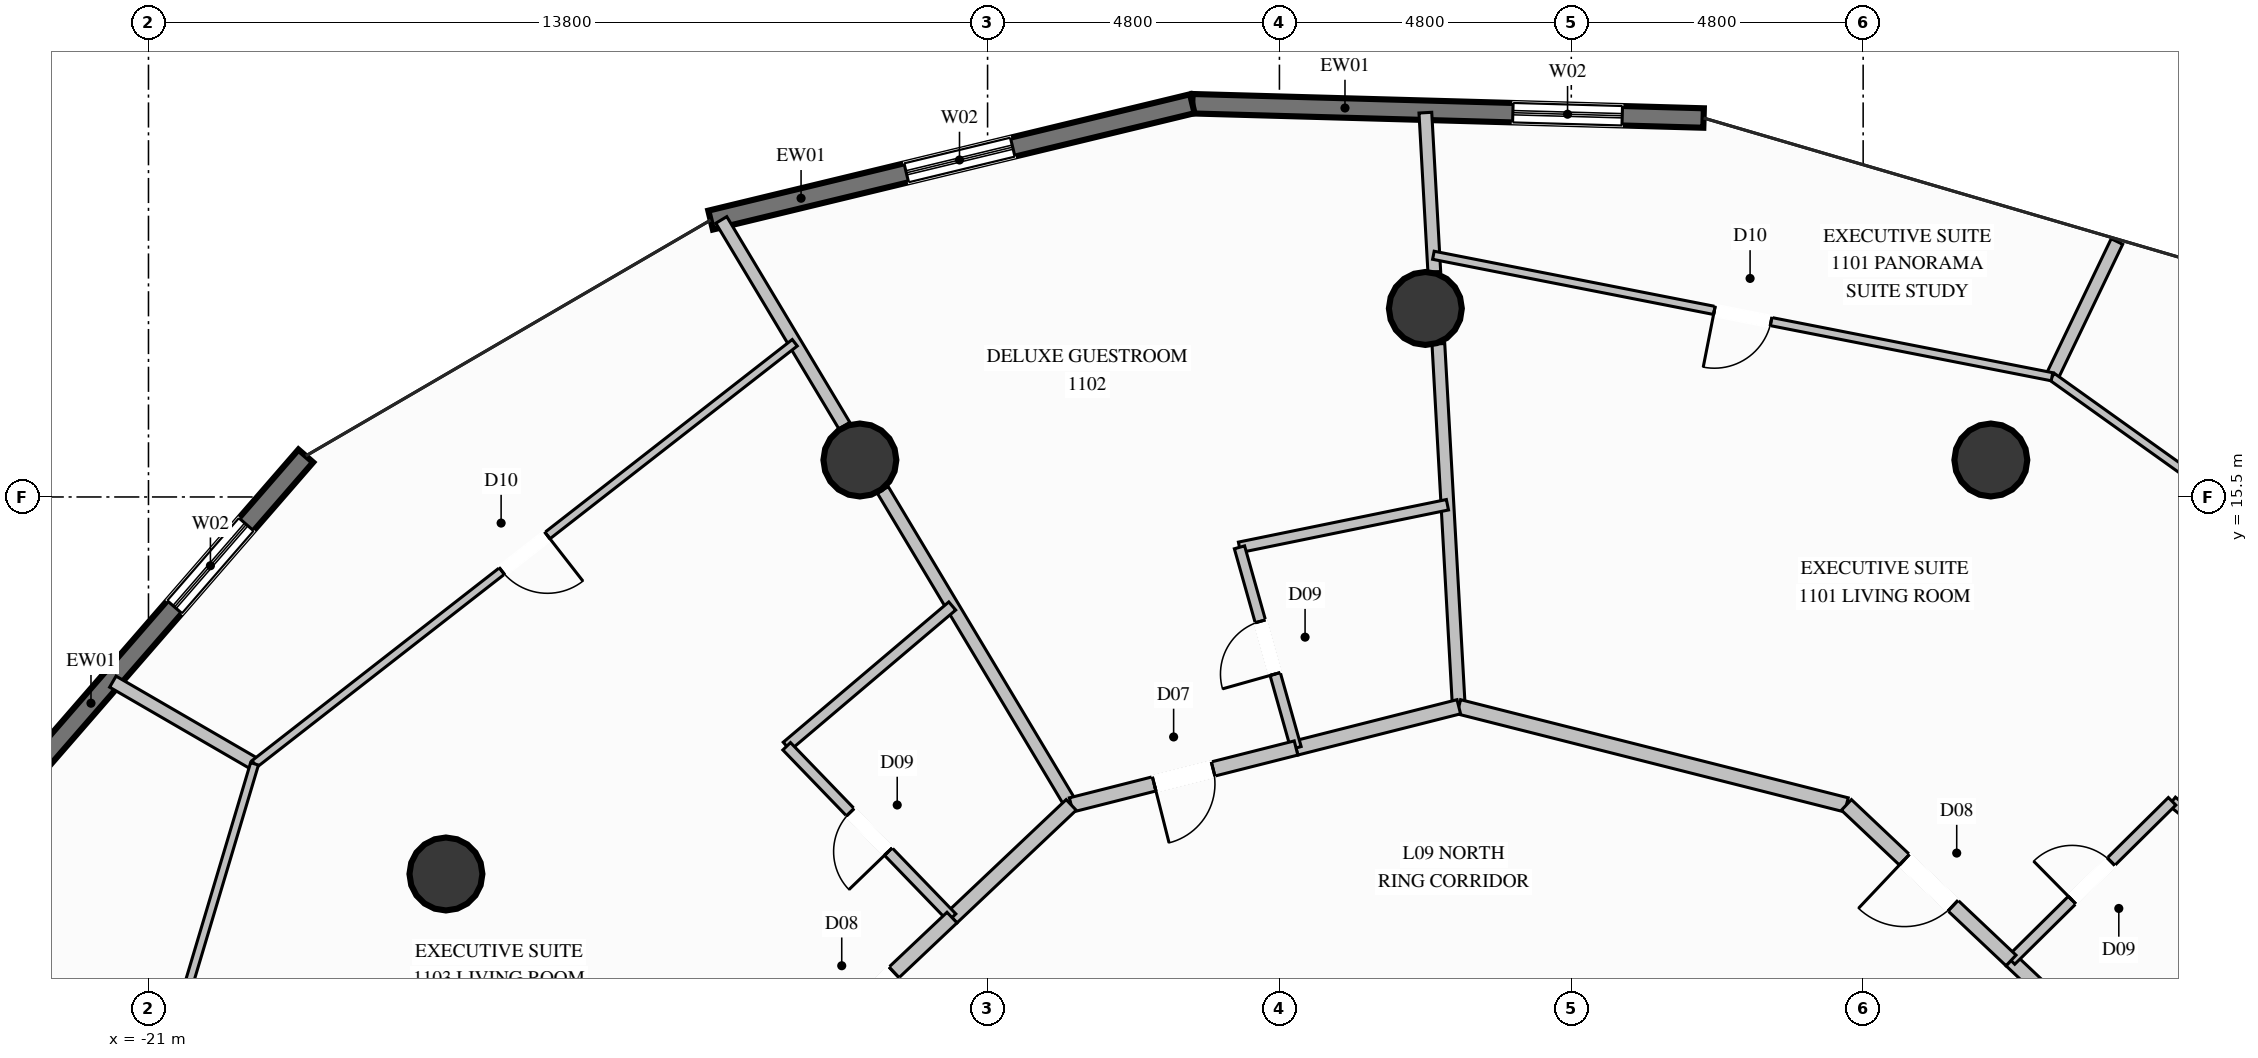
"""IFC4 building model, lengths in metres.
Left out: names, types, materials, properties, quantities, classifications, styles, units other than length and angle.
Written with IfcOpenShell. Run it as: python <this file> out.ifc"""

import sys

from ifc_helpers import new_model, si_unit, direction, frame, frame_2d, origin, origin_2d, place, context, subcontext, project, spatial, rectangle, circle, extrude, element, fill, save


model = new_model("IFC4")
c1 = context("Model", 3, precision=1e-05, world=origin(), true_north=direction((0.0, 1.0)))
c2 = subcontext(c1, "Body", "Model", "MODEL_VIEW")
j1 = project(units=[si_unit("LENGTHUNIT", "METRE"), si_unit("PLANEANGLEUNIT", "RADIAN")], contexts=[c1])
p1 = place(None, origin())
s1 = spatial("IfcSite", under=j1, at=p1, CompositionType="ELEMENT")
p2 = place(p1, origin())
s2 = spatial("IfcBuilding", under=s1, at=p2, CompositionType="ELEMENT")
p3 = place(p2, frame((0.0, 0.0, 42.8)))
s3 = spatial("IfcBuildingStorey", under=s2, at=p3, CompositionType="ELEMENT", Elevation=42.8)
for number, where, z_axis, x_axis in (
    (1, (9.3, 16.108, 0.0), (0.0, 0.0, 1.0), (1.0, 0.0, 0.0)),
    (2, (0.0, 18.6, 0.0), (0.0, 0.0, 1.0), (1.0, 0.0, 0.0)),
    (3, (-9.3, 16.108, 0.0), (0.0, 0.0, 1.0), (1.0, 0.0, 0.0)),
    (4, (-16.108, 9.3, 0.0), (0.0, 0.0, 1.0), (1.0, 0.0, 0.0)),
):
    element("IfcColumn", number, at=place(p3, frame(where, z_axis=z_axis, x_axis=x_axis)), inside=s3, PredefinedType="COLUMN", context=c2, shape_type="SweptSolid", body=[
        extrude(circle(Radius=0.6, at=origin_2d()), origin(), (0.0, 0.0, 1.0), 3.6),
    ])
p4 = place(p3, frame((-3.833, 21.967, 0.0), z_axis=(0.0, 0.0, 1.0), x_axis=(0.999609369541, -0.027948315271, 0.0)))
e5 = element("IfcWall", 5, at=p4, inside=s3, PredefinedType="SOLIDWALL", context=c2, shape_type="SweptSolid", body=[
    extrude(rectangle(XDim=8.412, YDim=0.32, at=frame_2d((4.206, 0.0))), origin(), (0.0, 0.0, 1.0), 3.34),
])
p5 = place(p4, frame((5.274, 0.0, 0.35)))
e6 = element("IfcOpeningElement", 6, at=p5, cuts=e5, PredefinedType="OPENING", context=c2, shape_type="SweptSolid", body=[
    extrude(rectangle(XDim=1.8, YDim=2.6, at=frame_2d((0.9, 1.3))), frame((0.0, 0.17, 0.0), z_axis=(0.0, -1.0, 0.0), x_axis=(1.0, 0.0, 0.0)), (0.0, 0.0, 1.0), 0.34),
])
p6 = place(p3, frame((-11.755, 20.053, 0.0), z_axis=(0.0, 0.0, 1.0), x_axis=(0.97202940664, 0.234859176161, 0.0)))
e7 = element("IfcWall", 7, at=p6, inside=s3, PredefinedType="SOLIDWALL", context=c2, shape_type="SweptSolid", body=[
    extrude(rectangle(XDim=8.15, YDim=0.32, at=frame_2d((4.075, 0.0))), origin(), (0.0, 0.0, 1.0), 3.34),
])
p7 = place(p6, frame((3.311, 0.0, 0.35)))
e8 = element("IfcOpeningElement", 8, at=p7, cuts=e7, PredefinedType="OPENING", context=c2, shape_type="SweptSolid", body=[
    extrude(rectangle(XDim=1.8, YDim=2.6, at=frame_2d((0.9, 1.3))), frame((0.0, 0.17, 0.0), z_axis=(0.0, -1.0, 0.0), x_axis=(1.0, 0.0, 0.0)), (0.0, 0.0, 1.0), 0.34),
])
p8 = place(p3, frame((-23.156, 10.715, 0.0), z_axis=(0.0, 0.0, 1.0), x_axis=(0.655795022555, 0.75493899647, 0.0)))
e9 = element("IfcWall", 9, at=p8, inside=s3, PredefinedType="SOLIDWALL", context=c2, shape_type="SweptSolid", body=[
    extrude(rectangle(XDim=7.232, YDim=0.32, at=frame_2d((3.616, 0.0))), origin(), (0.0, 0.0, 1.0), 3.34),
])
p9 = place(p8, frame((3.941, 0.0, 0.35)))
e10 = element("IfcOpeningElement", 10, at=p9, cuts=e9, PredefinedType="OPENING", context=c2, shape_type="SweptSolid", body=[
    extrude(rectangle(XDim=1.8, YDim=2.6, at=frame_2d((0.9, 1.3))), frame((0.0, 0.17, 0.0), z_axis=(0.0, -1.0, 0.0), x_axis=(1.0, 0.0, 0.0)), (0.0, 0.0, 1.0), 0.34),
])
p10 = place(p3, frame((11.592, 6.025, 0.0), z_axis=(0.0, 0.0, 1.0), x_axis=(0.841200533938, 0.540723276456, 0.0)))
e11 = element("IfcWall", 11, at=p10, inside=s3, PredefinedType="PARTITIONING", context=c2, shape_type="SweptSolid", body=[
    extrude(rectangle(XDim=5.034, YDim=0.21, at=frame_2d((2.517, 0.0))), origin(), (0.0, 0.0, 1.0), 2.708),
])
p11 = place(p3, frame((0.55, 12.05, 0.0), z_axis=(0.0, 0.0, 1.0), x_axis=(-0.056200663667, 0.998419493702, 0.0)))
e12 = element("IfcWall", 12, at=p11, inside=s3, PredefinedType="PARTITIONING", context=c2, shape_type="SweptSolid", body=[
    extrude(rectangle(XDim=5.978, YDim=0.21, at=frame_2d((2.989, 0.0))), origin(), (0.0, 0.0, 1.0), 2.708),
])
p12 = place(p3, frame((0.147, 19.202, 0.0), z_axis=(0.0, 0.0, 1.0), x_axis=(-0.056047530515, 0.99842810173, 0.0)))
e13 = element("IfcWall", 13, at=p12, inside=s3, PredefinedType="PARTITIONING", context=c2, shape_type="SweptSolid", body=[
    extrude(rectangle(XDim=2.622, YDim=0.21, at=frame_2d((1.311, 0.0))), origin(), (0.0, 0.0, 1.0), 3.34),
])
p13 = place(p3, frame((-5.825, 10.436, 0.0), z_axis=(0.0, 0.0, 1.0), x_axis=(-0.513299626213, 0.858209469611, 0.0)))
e14 = element("IfcWall", 14, at=p13, inside=s3, PredefinedType="PARTITIONING", context=c2, shape_type="SweptSolid", body=[
    extrude(rectangle(XDim=6.036, YDim=0.21, at=frame_2d((3.018, 0.0))), origin(), (0.0, 0.0, 1.0), 2.708),
])
p14 = place(p3, frame((-9.555, 16.673, 0.0), z_axis=(0.0, 0.0, 1.0), x_axis=(-0.513466244752, 0.858109792218, 0.0)))
e15 = element("IfcWall", 15, at=p14, inside=s3, PredefinedType="PARTITIONING", context=c2, shape_type="SweptSolid", body=[
    extrude(rectangle(XDim=3.942, YDim=0.21, at=frame_2d((1.971, 0.0))), origin(), (0.0, 0.0, 1.0), 3.34),
])
p15 = place(p3, frame((11.592, 6.025, 0.0), z_axis=(0.0, 0.0, 1.0), x_axis=(-0.726651583854, 0.687006168591, 0.0)))
e16 = element("IfcWall", 16, at=p15, inside=s3, PredefinedType="PARTITIONING", context=c2, shape_type="SweptSolid", body=[
    extrude(rectangle(XDim=2.697, YDim=0.24, at=frame_2d((1.349, 0.0))), origin(), (0.0, 0.0, 1.0), 3.34),
])
p16 = place(p3, frame((15.064, 8.257, 0.0), z_axis=(0.0, 0.0, 1.0), x_axis=(-0.779272237284, 0.626685551292, 0.0)))
e17 = element("IfcWall", 17, at=p16, inside=s3, PredefinedType="PLUMBINGWALL", context=c2, shape_type="SweptSolid", body=[
    extrude(rectangle(XDim=3.571, YDim=0.175, at=frame_2d((1.786, 0.0))), origin(), (0.0, 0.0, 1.0), 3.34),
])
p17 = place(p3, frame((9.632, 7.878, 0.0), z_axis=(0.0, 0.0, 1.0), x_axis=(0.711355516102, 0.702832362453, 0.0)))
e18 = element("IfcWall", 18, at=p17, inside=s3, PredefinedType="PLUMBINGWALL", context=c2, shape_type="SweptSolid", body=[
    extrude(rectangle(XDim=3.724, YDim=0.175, at=frame_2d((1.862, 0.0))), origin(), (0.0, 0.0, 1.0), 3.34),
])
p18 = place(p17, frame((1.412, 0.0, 0.0)))
e19 = element("IfcOpeningElement", 19, at=p18, cuts=e18, PredefinedType="OPENING", context=c2, shape_type="SweptSolid", body=[
    extrude(rectangle(XDim=0.9, YDim=2.1, at=frame_2d((0.45, 1.05))), frame((0.0, 0.098, 0.0), z_axis=(0.0, -1.0, 0.0), x_axis=(1.0, 0.0, 0.0)), (0.0, 0.0, 1.0), 0.195),
])
p19 = place(p3, frame((10.306, 17.477, 0.0), z_axis=(0.0, 0.0, 1.0), x_axis=(0.43294660359, 0.901419568481, 0.0)))
e20 = element("IfcWall", 20, at=p19, inside=s3, PredefinedType="PARTITIONING", context=c2, shape_type="SweptSolid", body=[
    extrude(rectangle(XDim=2.467, YDim=0.21, at=frame_2d((1.233, 0.0))), origin(), (0.0, 0.0, 1.0), 3.34),
])
p20 = place(p3, frame((6.925, 10.436, 0.0), z_axis=(0.0, 0.0, 1.0), x_axis=(-0.969413132073, 0.245434674331, 0.0)))
e21 = element("IfcWall", 21, at=p20, inside=s3, PredefinedType="PARTITIONING", context=c2, shape_type="SweptSolid", body=[
    extrude(rectangle(XDim=6.576, YDim=0.24, at=frame_2d((3.288, 0.0))), origin(), (0.0, 0.0, 1.0), 2.918),
])
p21 = place(p3, frame((9.632, 7.878, 0.0), z_axis=(0.0, 0.0, 1.0), x_axis=(-0.726816794063, 0.686831382413, 0.0)))
e22 = element("IfcWall", 22, at=p21, inside=s3, PredefinedType="PARTITIONING", context=c2, shape_type="SweptSolid", body=[
    extrude(rectangle(XDim=3.725, YDim=0.24, at=frame_2d((1.862, 0.0))), origin(), (0.0, 0.0, 1.0), 3.34),
])
p22 = place(p21, frame((1.312, 0.0, 0.0)))
e23 = element("IfcOpeningElement", 23, at=p22, cuts=e22, PredefinedType="OPENING", context=c2, shape_type="SweptSolid", body=[
    extrude(rectangle(XDim=1.1, YDim=2.3, at=frame_2d((0.55, 1.15))), frame((0.0, 0.13, 0.0), z_axis=(0.0, -1.0, 0.0), x_axis=(1.0, 0.0, 0.0)), (0.0, 0.0, 1.0), 0.26),
])
p23 = place(p3, frame((19.354, 11.014, 0.0), z_axis=(0.0, 0.0, 1.0), x_axis=(-0.813724569885, 0.581250655367, 0.0)))
e24 = element("IfcWall", 24, at=p23, inside=s3, PredefinedType="PARTITIONING", context=c2, shape_type="SweptSolid", body=[
    extrude(rectangle(XDim=11.119, YDim=0.135, at=frame_2d((5.56, 0.0))), origin(), (0.0, 0.0, 1.0), 3.34),
])
p24 = place(p23, frame((5.085, 0.0, 0.0)))
e25 = element("IfcOpeningElement", 25, at=p24, cuts=e24, PredefinedType="OPENING", context=c2, shape_type="SweptSolid", body=[
    extrude(rectangle(XDim=0.95, YDim=2.1, at=frame_2d((0.475, 1.05))), frame((0.0, 0.078, 0.0), z_axis=(0.0, -1.0, 0.0), x_axis=(1.0, 0.0, 0.0)), (0.0, 0.0, 1.0), 0.155),
])
p25 = place(p3, frame((10.306, 17.477, 0.0), z_axis=(0.0, 0.0, 1.0), x_axis=(-0.981255818222, 0.192709675953, 0.0)))
e26 = element("IfcWall", 26, at=p25, inside=s3, PredefinedType="PARTITIONING", context=c2, shape_type="SweptSolid", body=[
    extrude(rectangle(XDim=10.368, YDim=0.135, at=frame_2d((5.184, 0.0))), origin(), (0.0, 0.0, 1.0), 3.34),
])
p26 = place(p25, frame((4.709, 0.0, 0.0)))
e27 = element("IfcOpeningElement", 27, at=p26, cuts=e26, PredefinedType="OPENING", context=c2, shape_type="SweptSolid", body=[
    extrude(rectangle(XDim=0.95, YDim=2.1, at=frame_2d((0.475, 1.05))), frame((0.0, 0.078, 0.0), z_axis=(0.0, -1.0, 0.0), x_axis=(1.0, 0.0, 0.0)), (0.0, 0.0, 1.0), 0.155),
])
p27 = place(p3, frame((0.55, 12.05, 0.0), z_axis=(0.0, 0.0, 1.0), x_axis=(-0.969394271919, -0.245509155779, 0.0)))
e28 = element("IfcWall", 28, at=p27, inside=s3, PredefinedType="PARTITIONING", context=c2, shape_type="SweptSolid", body=[
    extrude(rectangle(XDim=2.761, YDim=0.24, at=frame_2d((1.381, 0.0))), origin(), (0.0, 0.0, 1.0), 2.918),
])
p28 = place(p3, frame((0.363, 15.372, 0.0), z_axis=(0.0, 0.0, 1.0), x_axis=(-0.979691208228, -0.200512185465, 0.0)))
e29 = element("IfcWall", 29, at=p28, inside=s3, PredefinedType="PLUMBINGWALL", context=c2, shape_type="SweptSolid", body=[
    extrude(rectangle(XDim=3.491, YDim=0.175, at=frame_2d((1.745, 0.0))), origin(), (0.0, 0.0, 1.0), 3.34),
])
p29 = place(p3, frame((-2.127, 11.372, 0.0), z_axis=(0.0, 0.0, 1.0), x_axis=(-0.271230141643, 0.962514524703, 0.0)))
e30 = element("IfcWall", 30, at=p29, inside=s3, PredefinedType="PLUMBINGWALL", context=c2, shape_type="SweptSolid", body=[
    extrude(rectangle(XDim=3.428, YDim=0.175, at=frame_2d((1.714, 0.0))), origin(), (0.0, 0.0, 1.0), 3.34),
])
p30 = place(p29, frame((1.264, 0.0, 0.0)))
e31 = element("IfcOpeningElement", 31, at=p30, cuts=e30, PredefinedType="OPENING", context=c2, shape_type="SweptSolid", body=[
    extrude(rectangle(XDim=0.9, YDim=2.1, at=frame_2d((0.45, 1.05))), frame((0.0, 0.098, 0.0), z_axis=(0.0, -1.0, 0.0), x_axis=(1.0, 0.0, 0.0)), (0.0, 0.0, 1.0), 0.195),
])
p31 = place(p3, frame((-2.127, 11.372, 0.0), z_axis=(0.0, 0.0, 1.0), x_axis=(-0.969426781934, -0.245380754072, 0.0)))
e32 = element("IfcWall", 32, at=p31, inside=s3, PredefinedType="PARTITIONING", context=c2, shape_type="SweptSolid", body=[
    extrude(rectangle(XDim=3.815, YDim=0.24, at=frame_2d((1.907, 0.0))), origin(), (0.0, 0.0, 1.0), 2.918),
])
p32 = place(p31, frame((1.407, 0.0, 0.0)))
e33 = element("IfcOpeningElement", 33, at=p32, cuts=e32, PredefinedType="OPENING", context=c2, shape_type="SweptSolid", body=[
    extrude(rectangle(XDim=1.0, YDim=2.2, at=frame_2d((0.5, 1.1))), frame((0.0, 0.13, 0.0), z_axis=(0.0, -1.0, 0.0), x_axis=(1.0, 0.0, 0.0)), (0.0, 0.0, 1.0), 0.26),
])
p33 = place(p3, frame((-5.825, 10.436, 0.0), z_axis=(0.0, 0.0, 1.0), x_axis=(-0.726651583854, -0.687006168591, 0.0)))
e34 = element("IfcWall", 34, at=p33, inside=s3, PredefinedType="PARTITIONING", context=c2, shape_type="SweptSolid", body=[
    extrude(rectangle(XDim=2.697, YDim=0.24, at=frame_2d((1.349, 0.0))), origin(), (0.0, 0.0, 1.0), 3.34),
])
p34 = place(p3, frame((-7.781, 13.707, 0.0), z_axis=(0.0, 0.0, 1.0), x_axis=(-0.762952785228, -0.646454211459, 0.0)))
e35 = element("IfcWall", 35, at=p34, inside=s3, PredefinedType="PLUMBINGWALL", context=c2, shape_type="SweptSolid", body=[
    extrude(rectangle(XDim=3.569, YDim=0.175, at=frame_2d((1.784, 0.0))), origin(), (0.0, 0.0, 1.0), 3.34),
])
p35 = place(p3, frame((-7.785, 8.583, 0.0), z_axis=(0.0, 0.0, 1.0), x_axis=(-0.694493235648, 0.71949923255, 0.0)))
e36 = element("IfcWall", 36, at=p35, inside=s3, PredefinedType="PLUMBINGWALL", context=c2, shape_type="SweptSolid", body=[
    extrude(rectangle(XDim=3.915, YDim=0.175, at=frame_2d((1.958, 0.0))), origin(), (0.0, 0.0, 1.0), 2.708),
])
p36 = place(p35, frame((1.508, 0.0, 0.0)))
e37 = element("IfcOpeningElement", 37, at=p36, cuts=e36, PredefinedType="OPENING", context=c2, shape_type="SweptSolid", body=[
    extrude(rectangle(XDim=0.9, YDim=2.1, at=frame_2d((0.45, 1.05))), frame((0.0, 0.098, 0.0), z_axis=(0.0, -1.0, 0.0), x_axis=(1.0, 0.0, 0.0)), (0.0, 0.0, 1.0), 0.195),
])
p37 = place(p3, frame((-19.256, 11.111, 0.0), z_axis=(0.0, 0.0, 1.0), x_axis=(-0.864950144423, 0.501857796256, 0.0)))
e38 = element("IfcWall", 38, at=p37, inside=s3, PredefinedType="PARTITIONING", context=c2, shape_type="SweptSolid", body=[
    extrude(rectangle(XDim=2.694, YDim=0.21, at=frame_2d((1.347, 0.0))), origin(), (0.0, 0.0, 1.0), 3.34),
])
p38 = place(p3, frame((-7.785, 8.583, 0.0), z_axis=(0.0, 0.0, 1.0), x_axis=(-0.726816794063, -0.686831382413, 0.0)))
e39 = element("IfcWall", 39, at=p38, inside=s3, PredefinedType="PARTITIONING", context=c2, shape_type="SweptSolid", body=[
    extrude(rectangle(XDim=3.725, YDim=0.24, at=frame_2d((1.862, 0.0))), origin(), (0.0, 0.0, 1.0), 3.34),
])
p39 = place(p38, frame((1.312, 0.0, 0.0)))
e40 = element("IfcOpeningElement", 40, at=p39, cuts=e39, PredefinedType="OPENING", context=c2, shape_type="SweptSolid", body=[
    extrude(rectangle(XDim=1.1, YDim=2.3, at=frame_2d((0.55, 1.15))), frame((0.0, 0.13, 0.0), z_axis=(0.0, -1.0, 0.0), x_axis=(1.0, 0.0, 0.0)), (0.0, 0.0, 1.0), 0.26),
])
p40 = place(p3, frame((-10.371, 18.036, 0.0), z_axis=(0.0, 0.0, 1.0), x_axis=(-0.788739150212, -0.614728031671, 0.0)))
e41 = element("IfcWall", 41, at=p40, inside=s3, PredefinedType="PARTITIONING", context=c2, shape_type="SweptSolid", body=[
    extrude(rectangle(XDim=11.265, YDim=0.135, at=frame_2d((5.632, 0.0))), origin(), (0.0, 0.0, 1.0), 3.34),
])
p41 = place(p40, frame((5.157, 0.0, 0.0)))
e42 = element("IfcOpeningElement", 42, at=p41, cuts=e41, PredefinedType="OPENING", context=c2, shape_type="SweptSolid", body=[
    extrude(rectangle(XDim=0.95, YDim=2.1, at=frame_2d((0.475, 1.05))), frame((0.0, 0.078, 0.0), z_axis=(0.0, -1.0, 0.0), x_axis=(1.0, 0.0, 0.0)), (0.0, 0.0, 1.0), 0.155),
])
p42 = place(p3, frame((-19.256, 11.111, 0.0), z_axis=(0.0, 0.0, 1.0), x_axis=(-0.28604764492, -0.958215395846, 0.0)))
e43 = element("IfcWall", 43, at=p42, inside=s3, PredefinedType="PARTITIONING", context=c2, shape_type="SweptSolid", body=[
    extrude(rectangle(XDim=11.596, YDim=0.135, at=frame_2d((5.798, 0.0))), origin(), (0.0, 0.0, 1.0), 3.34),
])
p43 = place(p42, frame((5.323, 0.0, 0.0)))
e44 = element("IfcOpeningElement", 44, at=p43, cuts=e43, PredefinedType="OPENING", context=c2, shape_type="SweptSolid", body=[
    extrude(rectangle(XDim=0.95, YDim=2.1, at=frame_2d((0.475, 1.05))), frame((0.0, 0.078, 0.0), z_axis=(0.0, -1.0, 0.0), x_axis=(1.0, 0.0, 0.0)), (0.0, 0.0, 1.0), 0.155),
])
p44 = place(p5, origin())
e45 = element("IfcWindow", 45, at=p44, inside=s3, PartitioningType="SINGLE_PANEL", PredefinedType="WINDOW", context=c2, shape_type="SweptSolid", body=[
    extrude(rectangle(XDim=1.8, YDim=2.6, at=frame_2d((0.9, 1.3))), frame((0.0, 0.03, 0.0), z_axis=(0.0, -1.0, 0.0), x_axis=(1.0, 0.0, 0.0)), (0.0, 0.0, 1.0), 0.06),
])
fill(e6, e45)
p45 = place(p7, origin())
e46 = element("IfcWindow", 46, at=p45, inside=s3, PartitioningType="SINGLE_PANEL", PredefinedType="WINDOW", context=c2, shape_type="SweptSolid", body=[
    extrude(rectangle(XDim=1.8, YDim=2.6, at=frame_2d((0.9, 1.3))), frame((0.0, 0.03, 0.0), z_axis=(0.0, -1.0, 0.0), x_axis=(1.0, 0.0, 0.0)), (0.0, 0.0, 1.0), 0.06),
])
fill(e8, e46)
p46 = place(p9, origin())
e47 = element("IfcWindow", 47, at=p46, inside=s3, PartitioningType="SINGLE_PANEL", PredefinedType="WINDOW", context=c2, shape_type="SweptSolid", body=[
    extrude(rectangle(XDim=1.8, YDim=2.6, at=frame_2d((0.9, 1.3))), frame((0.0, 0.03, 0.0), z_axis=(0.0, -1.0, 0.0), x_axis=(1.0, 0.0, 0.0)), (0.0, 0.0, 1.0), 0.06),
])
fill(e10, e47)
p47 = place(p18, origin())
e48 = element("IfcDoor", 48, at=p47, inside=s3, OperationType="SINGLE_SWING_LEFT", PredefinedType="DOOR", context=c2, shape_type="SweptSolid", body=[
    extrude(rectangle(XDim=0.9, YDim=2.1, at=frame_2d((0.45, 1.05))), frame((0.0, 0.025, 0.0), z_axis=(0.0, -1.0, 0.0), x_axis=(1.0, 0.0, 0.0)), (0.0, 0.0, 1.0), 0.05),
])
fill(e19, e48)
p48 = place(p22, origin())
e49 = element("IfcDoor", 49, at=p48, inside=s3, OperationType="SINGLE_SWING_RIGHT", PredefinedType="DOOR", context=c2, shape_type="SweptSolid", body=[
    extrude(rectangle(XDim=1.1, YDim=2.3, at=frame_2d((0.55, 1.15))), frame((0.0, 0.025, 0.0), z_axis=(0.0, -1.0, 0.0), x_axis=(1.0, 0.0, 0.0)), (0.0, 0.0, 1.0), 0.05),
])
fill(e23, e49)
p49 = place(p26, origin())
e50 = element("IfcDoor", 50, at=p49, inside=s3, OperationType="SINGLE_SWING_RIGHT", PredefinedType="DOOR", context=c2, shape_type="SweptSolid", body=[
    extrude(rectangle(XDim=0.95, YDim=2.1, at=frame_2d((0.475, 1.05))), frame((0.0, 0.025, 0.0), z_axis=(0.0, -1.0, 0.0), x_axis=(1.0, 0.0, 0.0)), (0.0, 0.0, 1.0), 0.05),
])
fill(e27, e50)
p50 = place(p30, origin())
e51 = element("IfcDoor", 51, at=p50, inside=s3, OperationType="SINGLE_SWING_LEFT", PredefinedType="DOOR", context=c2, shape_type="SweptSolid", body=[
    extrude(rectangle(XDim=0.9, YDim=2.1, at=frame_2d((0.45, 1.05))), frame((0.0, 0.025, 0.0), z_axis=(0.0, -1.0, 0.0), x_axis=(1.0, 0.0, 0.0)), (0.0, 0.0, 1.0), 0.05),
])
fill(e31, e51)
p51 = place(p32, origin())
e52 = element("IfcDoor", 52, at=p51, inside=s3, OperationType="SINGLE_SWING_RIGHT", PredefinedType="DOOR", context=c2, shape_type="SweptSolid", body=[
    extrude(rectangle(XDim=1.0, YDim=2.2, at=frame_2d((0.5, 1.1))), frame((0.0, 0.025, 0.0), z_axis=(0.0, -1.0, 0.0), x_axis=(1.0, 0.0, 0.0)), (0.0, 0.0, 1.0), 0.05),
])
fill(e33, e52)
p52 = place(p36, origin())
e53 = element("IfcDoor", 53, at=p52, inside=s3, OperationType="SINGLE_SWING_LEFT", PredefinedType="DOOR", context=c2, shape_type="SweptSolid", body=[
    extrude(rectangle(XDim=0.9, YDim=2.1, at=frame_2d((0.45, 1.05))), frame((0.0, 0.025, 0.0), z_axis=(0.0, -1.0, 0.0), x_axis=(1.0, 0.0, 0.0)), (0.0, 0.0, 1.0), 0.05),
])
fill(e37, e53)
p53 = place(p39, origin())
e54 = element("IfcDoor", 54, at=p53, inside=s3, OperationType="SINGLE_SWING_RIGHT", PredefinedType="DOOR", context=c2, shape_type="SweptSolid", body=[
    extrude(rectangle(XDim=1.1, YDim=2.3, at=frame_2d((0.55, 1.15))), frame((0.0, 0.025, 0.0), z_axis=(0.0, -1.0, 0.0), x_axis=(1.0, 0.0, 0.0)), (0.0, 0.0, 1.0), 0.05),
])
fill(e40, e54)
p54 = place(p41, origin())
e55 = element("IfcDoor", 55, at=p54, inside=s3, OperationType="SINGLE_SWING_LEFT", PredefinedType="DOOR", context=c2, shape_type="SweptSolid", body=[
    extrude(rectangle(XDim=0.95, YDim=2.1, at=frame_2d((0.475, 1.05))), frame((0.0, 0.025, 0.0), z_axis=(0.0, -1.0, 0.0), x_axis=(1.0, 0.0, 0.0)), (0.0, 0.0, 1.0), 0.05),
])
fill(e42, e55)
save(model, sys.argv[1])
